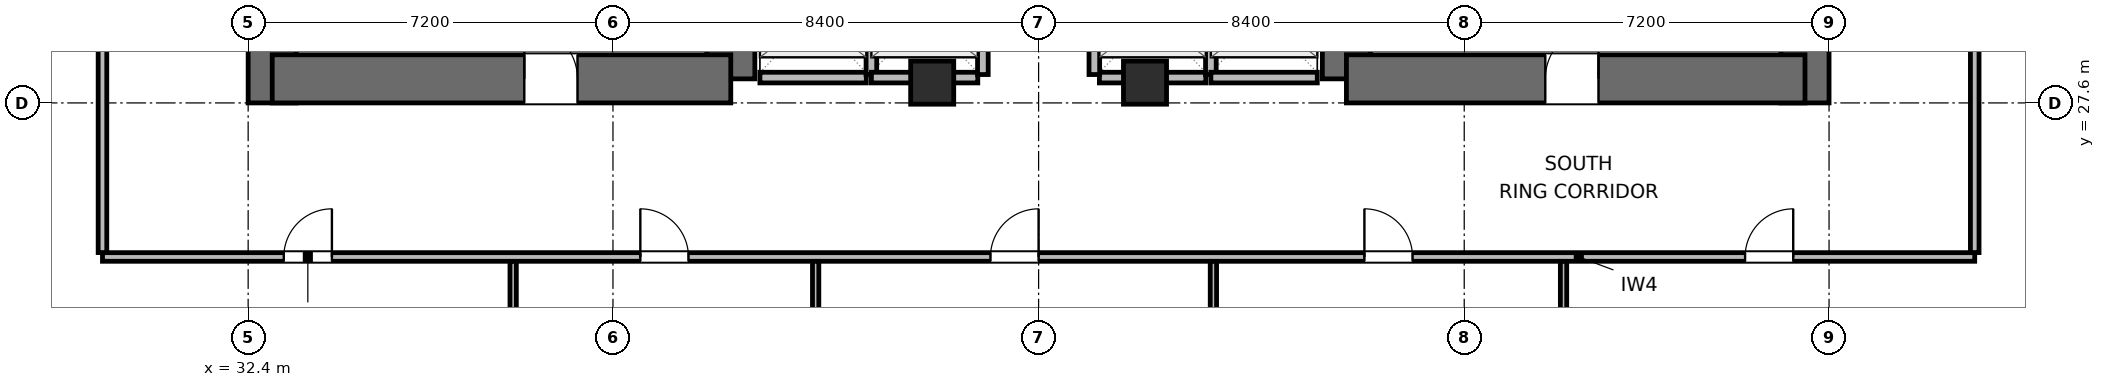
"""IFC4 building model, lengths in metres.
Left out: names, types, materials, properties, quantities, classifications, styles, units other than length and angle.
Written with IfcOpenShell. Run it as: python <this file> out.ifc"""

import sys

from ifc_helpers import new_model, si_unit, direction, frame, frame_2d, origin, origin_2d, place, context, subcontext, project, spatial, rectangle, extrude, element, fill, save


model = new_model("IFC4")
c1 = context("Model", 3, precision=1e-05, world=origin(), true_north=direction((0.0, 1.0)))
c2 = subcontext(c1, "Body", "Model", "MODEL_VIEW")
j1 = project(units=[si_unit("LENGTHUNIT", "METRE"), si_unit("PLANEANGLEUNIT", "RADIAN")], contexts=[c1])
p1 = place(None, origin())
s1 = spatial("IfcSite", under=j1, at=p1, CompositionType="ELEMENT")
p2 = place(p1, origin())
s2 = spatial("IfcBuilding", under=s1, at=p2, CompositionType="ELEMENT")
p3 = place(p2, frame((0.0, 0.0, 76.8)))
s3 = spatial("IfcBuildingStorey", under=s2, at=p3, CompositionType="ELEMENT", Elevation=76.8)
p4 = place(p3, frame((32.875, 27.6, 0.0), z_axis=(0.0, 0.0, 1.0), x_axis=(0.0, 1.0, 0.0)))
e1 = element("IfcWall", 1, at=p4, inside=s3, PredefinedType="SHEAR", context=c2, shape_type="SweptSolid", body=[
    extrude(rectangle(XDim=16.8, YDim=0.95, at=frame_2d((8.4, 0.0))), origin(), (0.0, 0.0, 1.0), 3.9),
])
p5 = place(p3, frame((41.925, 28.075, 0.0), z_axis=(0.0, 0.0, 1.0), x_axis=(0.0, 1.0, 0.0)))
e2 = element("IfcWall", 2, at=p5, inside=s3, PredefinedType="SHEAR", context=c2, shape_type="SweptSolid", body=[
    extrude(rectangle(XDim=6.325, YDim=0.95, at=frame_2d((3.163, 0.0))), origin(), (0.0, 0.0, 1.0), 3.9),
])
p6 = place(p3, frame((32.875, 28.075, 0.0), z_axis=(0.0, 0.0, 1.0), x_axis=(1.0, 0.0, 0.0)))
e3 = element("IfcWall", 3, at=p6, inside=s3, PredefinedType="SHEAR", context=c2, shape_type="SweptSolid", body=[
    extrude(rectangle(XDim=9.05, YDim=0.95, at=frame_2d((4.525, 0.0))), origin(), (0.0, 0.0, 1.0), 3.9),
])
p7 = place(p6, frame((4.975, 0.0, 0.0)))
e4 = element("IfcOpeningElement", 4, at=p7, cuts=e3, PredefinedType="OPENING", context=c2, shape_type="SweptSolid", body=[
    extrude(rectangle(XDim=1.05, YDim=2.04, at=frame_2d((0.525, 1.02))), frame((0.0, 0.485, 0.0), z_axis=(0.0, -1.0, 0.0), x_axis=(1.0, 0.0, 0.0)), (0.0, 0.0, 1.0), 0.97),
])
p8 = place(p3, frame((54.075, 28.075, 0.0), z_axis=(0.0, 0.0, 1.0), x_axis=(0.0, 1.0, 0.0)))
e5 = element("IfcWall", 5, at=p8, inside=s3, PredefinedType="SHEAR", context=c2, shape_type="SweptSolid", body=[
    extrude(rectangle(XDim=7.725, YDim=0.95, at=frame_2d((3.863, 0.0))), origin(), (0.0, 0.0, 1.0), 3.9),
])
p9 = place(p3, frame((63.125, 27.6, 0.0), z_axis=(0.0, 0.0, 1.0), x_axis=(0.0, 1.0, 0.0)))
e6 = element("IfcWall", 6, at=p9, inside=s3, PredefinedType="SHEAR", context=c2, shape_type="SweptSolid", body=[
    extrude(rectangle(XDim=16.8, YDim=0.95, at=frame_2d((8.4, 0.0))), origin(), (0.0, 0.0, 1.0), 3.9),
])
p10 = place(p3, frame((54.075, 28.075, 0.0), z_axis=(0.0, 0.0, 1.0), x_axis=(1.0, 0.0, 0.0)))
e7 = element("IfcWall", 7, at=p10, inside=s3, PredefinedType="SHEAR", context=c2, shape_type="SweptSolid", body=[
    extrude(rectangle(XDim=9.05, YDim=0.95, at=frame_2d((4.525, 0.0))), origin(), (0.0, 0.0, 1.0), 3.9),
])
p11 = place(p10, frame((3.925, 0.0, 0.0)))
e8 = element("IfcOpeningElement", 8, at=p11, cuts=e7, PredefinedType="OPENING", context=c2, shape_type="SweptSolid", body=[
    extrude(rectangle(XDim=1.05, YDim=2.04, at=frame_2d((0.525, 1.02))), frame((0.0, 0.485, 0.0), z_axis=(0.0, -1.0, 0.0), x_axis=(1.0, 0.0, 0.0)), (0.0, 0.0, 1.0), 0.97),
])
for number, where, z_axis, x_axis in (
    (9, (45.9, 28.0, 0.0), (0.0, 0.0, 1.0), (1.0, 0.0, 0.0)),
    (10, (50.1, 28.0, 0.0), (0.0, 0.0, 1.0), (1.0, 0.0, 0.0)),
):
    element("IfcColumn", number, at=place(p3, frame(where, z_axis=z_axis, x_axis=x_axis)), inside=s3, PredefinedType="COLUMN", context=c2, shape_type="SweptSolid", body=[
        extrude(rectangle(XDim=0.85, YDim=0.85, at=origin_2d()), origin(), (0.0, 0.0, 1.0), 3.9),
    ])
p12 = place(p3, frame((42.5, 28.1, 0.0), z_axis=(0.0, 0.0, 1.0), x_axis=(1.0, 0.0, 0.0)))
e11 = element("IfcWall", 11, at=p12, inside=s3, PredefinedType="PARTITIONING", context=c2, shape_type="SweptSolid", body=[
    extrude(rectangle(XDim=2.1, YDim=0.21, at=frame_2d((1.05, 0.0))), origin(), (0.0, 0.0, 1.0), 2.485),
])
p13 = place(p3, frame((44.7, 28.16, 0.0), z_axis=(0.0, 0.0, 1.0), x_axis=(0.0, 1.0, 0.0)))
e12 = element("IfcWall", 12, at=p13, inside=s3, PredefinedType="PARTITIONING", context=c2, shape_type="SweptSolid", body=[
    extrude(rectangle(XDim=2.28, YDim=0.21, at=frame_2d((1.14, 0.0))), origin(), (0.0, 0.0, 1.0), 3.6),
])
p14 = place(p3, frame((44.7, 28.1, 0.0), z_axis=(0.0, 0.0, 1.0), x_axis=(1.0, 0.0, 0.0)))
e13 = element("IfcWall", 13, at=p14, inside=s3, PredefinedType="PARTITIONING", context=c2, shape_type="SweptSolid", body=[
    extrude(rectangle(XDim=2.1, YDim=0.21, at=frame_2d((1.05, 0.0))), origin(), (0.0, 0.0, 1.0), 2.485),
])
p15 = place(p3, frame((46.9, 28.16, 0.0), z_axis=(0.0, 0.0, 1.0), x_axis=(0.0, 1.0, 0.0)))
e14 = element("IfcWall", 14, at=p15, inside=s3, PredefinedType="PARTITIONING", context=c2, shape_type="SweptSolid", body=[
    extrude(rectangle(XDim=2.28, YDim=0.21, at=frame_2d((1.14, 0.0))), origin(), (0.0, 0.0, 1.0), 3.6),
])
p16 = place(p3, frame((49.2, 28.1, 0.0), z_axis=(0.0, 0.0, 1.0), x_axis=(1.0, 0.0, 0.0)))
e15 = element("IfcWall", 15, at=p16, inside=s3, PredefinedType="PARTITIONING", context=c2, shape_type="SweptSolid", body=[
    extrude(rectangle(XDim=2.1, YDim=0.21, at=frame_2d((1.05, 0.0))), origin(), (0.0, 0.0, 1.0), 2.485),
])
for number, where, z_axis, x_axis in (
    (16, (49.1, 28.16, 0.0), (0.0, 0.0, 1.0), (0.0, 1.0, 0.0)),
    (17, (51.4, 28.16, 0.0), (0.0, 0.0, 1.0), (0.0, 1.0, 0.0)),
):
    element("IfcWall", number, at=place(p3, frame(where, z_axis=z_axis, x_axis=x_axis)), inside=s3, PredefinedType="PARTITIONING", context=c2, shape_type="SweptSolid", body=[
        extrude(rectangle(XDim=2.28, YDim=0.21, at=frame_2d((1.14, 0.0))), origin(), (0.0, 0.0, 1.0), 3.6),
    ])
p17 = place(p3, frame((51.4, 28.1, 0.0), z_axis=(0.0, 0.0, 1.0), x_axis=(1.0, 0.0, 0.0)))
e18 = element("IfcWall", 18, at=p17, inside=s3, PredefinedType="PARTITIONING", context=c2, shape_type="SweptSolid", body=[
    extrude(rectangle(XDim=2.1, YDim=0.21, at=frame_2d((1.05, 0.0))), origin(), (0.0, 0.0, 1.0), 2.485),
])
p18 = place(p3, frame((29.525, 24.56, 0.0), z_axis=(0.0, 0.0, 1.0), x_axis=(1.0, 0.0, 0.0)))
e19 = element("IfcWall", 19, at=p18, inside=s3, PredefinedType="PARTITIONING", context=c2, shape_type="SweptSolid", body=[
    extrude(rectangle(XDim=36.95, YDim=0.17, at=frame_2d((18.475, 0.0))), origin(), (0.0, 0.0, 1.0), 3.6),
])
p19 = place(p18, frame((3.578, 0.0, 0.0)))
e20 = element("IfcOpeningElement", 20, at=p19, cuts=e19, PredefinedType="OPENING", context=c2, shape_type="SweptSolid", body=[
    extrude(rectangle(XDim=0.95, YDim=2.04, at=frame_2d((0.475, 1.02))), frame((0.0, 0.095, 0.0), z_axis=(0.0, -1.0, 0.0), x_axis=(1.0, 0.0, 0.0)), (0.0, 0.0, 1.0), 0.19),
])
p20 = place(p18, frame((10.615, 0.0, 0.0)))
e21 = element("IfcOpeningElement", 21, at=p20, cuts=e19, PredefinedType="OPENING", context=c2, shape_type="SweptSolid", body=[
    extrude(rectangle(XDim=0.95, YDim=2.04, at=frame_2d((0.475, 1.02))), frame((0.0, 0.095, 0.0), z_axis=(0.0, -1.0, 0.0), x_axis=(1.0, 0.0, 0.0)), (0.0, 0.0, 1.0), 0.19),
])
p21 = place(p18, frame((17.525, 0.0, 0.0)))
e22 = element("IfcOpeningElement", 22, at=p21, cuts=e19, PredefinedType="OPENING", context=c2, shape_type="SweptSolid", body=[
    extrude(rectangle(XDim=0.95, YDim=2.04, at=frame_2d((0.475, 1.02))), frame((0.0, 0.095, 0.0), z_axis=(0.0, -1.0, 0.0), x_axis=(1.0, 0.0, 0.0)), (0.0, 0.0, 1.0), 0.19),
])
p22 = place(p18, frame((24.905, 0.0, 0.0)))
e23 = element("IfcOpeningElement", 23, at=p22, cuts=e19, PredefinedType="OPENING", context=c2, shape_type="SweptSolid", body=[
    extrude(rectangle(XDim=0.95, YDim=2.04, at=frame_2d((0.475, 1.02))), frame((0.0, 0.095, 0.0), z_axis=(0.0, -1.0, 0.0), x_axis=(1.0, 0.0, 0.0)), (0.0, 0.0, 1.0), 0.19),
])
p23 = place(p18, frame((32.418, 0.0, 0.0)))
e24 = element("IfcOpeningElement", 24, at=p23, cuts=e19, PredefinedType="OPENING", context=c2, shape_type="SweptSolid", body=[
    extrude(rectangle(XDim=0.95, YDim=2.04, at=frame_2d((0.475, 1.02))), frame((0.0, 0.095, 0.0), z_axis=(0.0, -1.0, 0.0), x_axis=(1.0, 0.0, 0.0)), (0.0, 0.0, 1.0), 0.19),
])
p24 = place(p3, frame((29.525, 24.647, 0.0), z_axis=(0.0, 0.0, 1.0), x_axis=(0.0, 1.0, 0.0)))
e25 = element("IfcWall", 25, at=p24, inside=s3, PredefinedType="PARTITIONING", context=c2, shape_type="SweptSolid", body=[
    extrude(rectangle(XDim=22.706, YDim=0.17, at=frame_2d((11.353, 0.0))), origin(), (0.0, 0.0, 1.0), 3.6),
])
p25 = place(p24, frame((4.758, 0.0, 0.0)))
e26 = element("IfcOpeningElement", 26, at=p25, cuts=e25, PredefinedType="OPENING", context=c2, shape_type="SweptSolid", body=[
    extrude(rectangle(XDim=0.95, YDim=2.04, at=frame_2d((0.475, 1.02))), frame((0.0, 0.095, 0.0), z_axis=(0.0, -1.0, 0.0), x_axis=(1.0, 0.0, 0.0)), (0.0, 0.0, 1.0), 0.19),
])
p26 = place(p24, frame((16.198, 0.0, 0.0)))
e27 = element("IfcOpeningElement", 27, at=p26, cuts=e25, PredefinedType="OPENING", context=c2, shape_type="SweptSolid", body=[
    extrude(rectangle(XDim=0.95, YDim=2.04, at=frame_2d((0.475, 1.02))), frame((0.0, 0.095, 0.0), z_axis=(0.0, -1.0, 0.0), x_axis=(1.0, 0.0, 0.0)), (0.0, 0.0, 1.0), 0.19),
])
p27 = place(p3, frame((66.475, 24.647, 0.0), z_axis=(0.0, 0.0, 1.0), x_axis=(0.0, 1.0, 0.0)))
e28 = element("IfcWall", 28, at=p27, inside=s3, PredefinedType="PARTITIONING", context=c2, shape_type="SweptSolid", body=[
    extrude(rectangle(XDim=22.706, YDim=0.17, at=frame_2d((11.353, 0.0))), origin(), (0.0, 0.0, 1.0), 3.6),
])
p28 = place(p27, frame((4.658, 0.0, 0.0)))
e29 = element("IfcOpeningElement", 29, at=p28, cuts=e28, PredefinedType="OPENING", context=c2, shape_type="SweptSolid", body=[
    extrude(rectangle(XDim=0.95, YDim=2.04, at=frame_2d((0.475, 1.02))), frame((0.0, 0.095, 0.0), z_axis=(0.0, -1.0, 0.0), x_axis=(1.0, 0.0, 0.0)), (0.0, 0.0, 1.0), 0.19),
])
p29 = place(p27, frame((16.098, 0.0, 0.0)))
e30 = element("IfcOpeningElement", 30, at=p29, cuts=e28, PredefinedType="OPENING", context=c2, shape_type="SweptSolid", body=[
    extrude(rectangle(XDim=0.95, YDim=2.04, at=frame_2d((0.475, 1.02))), frame((0.0, 0.095, 0.0), z_axis=(0.0, -1.0, 0.0), x_axis=(1.0, 0.0, 0.0)), (0.0, 0.0, 1.0), 0.19),
])
p30 = place(p3, frame((37.63, 9.915, 0.0), z_axis=(0.0, 0.0, 1.0), x_axis=(0.0, 1.0, 0.0)))
e31 = element("IfcWall", 31, at=p30, inside=s3, PredefinedType="PARTITIONING", context=c2, shape_type="SweptSolid", body=[
    extrude(rectangle(XDim=14.558, YDim=0.125, at=frame_2d((7.279, 0.0))), origin(), (0.0, 0.0, 1.0), 3.6),
])
p31 = place(p3, frame((43.6, 13.575, 0.0), z_axis=(0.0, 0.0, 1.0), x_axis=(0.0, 1.0, 0.0)))
e32 = element("IfcWall", 32, at=p31, inside=s3, PredefinedType="PARTITIONING", context=c2, shape_type="SweptSolid", body=[
    extrude(rectangle(XDim=10.898, YDim=0.125, at=frame_2d((5.449, 0.0))), origin(), (0.0, 0.0, 1.0), 2.963),
])
p32 = place(p3, frame((51.45, 11.515, 0.0), z_axis=(0.0, 0.0, 1.0), x_axis=(0.0, 1.0, 0.0)))
e33 = element("IfcWall", 33, at=p32, inside=s3, PredefinedType="PARTITIONING", context=c2, shape_type="SweptSolid", body=[
    extrude(rectangle(XDim=12.958, YDim=0.125, at=frame_2d((6.479, 0.0))), origin(), (0.0, 0.0, 1.0), 2.963),
])
p33 = place(p3, frame((58.36, 9.915, 0.0), z_axis=(0.0, 0.0, 1.0), x_axis=(0.0, 1.0, 0.0)))
e34 = element("IfcWall", 34, at=p33, inside=s3, PredefinedType="PARTITIONING", context=c2, shape_type="SweptSolid", body=[
    extrude(rectangle(XDim=14.558, YDim=0.125, at=frame_2d((7.279, 0.0))), origin(), (0.0, 0.0, 1.0), 3.6),
])
p34 = place(p7, origin())
e35 = element("IfcDoor", 35, at=p34, inside=s3, OperationType="SINGLE_SWING_LEFT", PredefinedType="DOOR", context=c2, shape_type="SweptSolid", body=[
    extrude(rectangle(XDim=1.05, YDim=2.04, at=frame_2d((0.525, 1.02))), frame((0.0, 0.025, 0.0), z_axis=(0.0, -1.0, 0.0), x_axis=(1.0, 0.0, 0.0)), (0.0, 0.0, 1.0), 0.05),
])
fill(e4, e35)
p35 = place(p11, origin())
e36 = element("IfcDoor", 36, at=p35, inside=s3, OperationType="SINGLE_SWING_RIGHT", PredefinedType="DOOR", context=c2, shape_type="SweptSolid", body=[
    extrude(rectangle(XDim=1.05, YDim=2.04, at=frame_2d((0.525, 1.02))), frame((0.0, 0.025, 0.0), z_axis=(0.0, -1.0, 0.0), x_axis=(1.0, 0.0, 0.0)), (0.0, 0.0, 1.0), 0.05),
])
fill(e8, e36)
p36 = place(p19, origin())
e37 = element("IfcDoor", 37, at=p36, inside=s3, OperationType="SINGLE_SWING_RIGHT", PredefinedType="DOOR", context=c2, shape_type="SweptSolid", body=[
    extrude(rectangle(XDim=0.95, YDim=2.04, at=frame_2d((0.475, 1.02))), frame((0.0, 0.025, 0.0), z_axis=(0.0, -1.0, 0.0), x_axis=(1.0, 0.0, 0.0)), (0.0, 0.0, 1.0), 0.05),
])
fill(e20, e37)
p37 = place(p20, origin())
e38 = element("IfcDoor", 38, at=p37, inside=s3, OperationType="SINGLE_SWING_LEFT", PredefinedType="DOOR", context=c2, shape_type="SweptSolid", body=[
    extrude(rectangle(XDim=0.95, YDim=2.04, at=frame_2d((0.475, 1.02))), frame((0.0, 0.025, 0.0), z_axis=(0.0, -1.0, 0.0), x_axis=(1.0, 0.0, 0.0)), (0.0, 0.0, 1.0), 0.05),
])
fill(e21, e38)
p38 = place(p21, origin())
e39 = element("IfcDoor", 39, at=p38, inside=s3, OperationType="SINGLE_SWING_RIGHT", PredefinedType="DOOR", context=c2, shape_type="SweptSolid", body=[
    extrude(rectangle(XDim=0.95, YDim=2.04, at=frame_2d((0.475, 1.02))), frame((0.0, 0.025, 0.0), z_axis=(0.0, -1.0, 0.0), x_axis=(1.0, 0.0, 0.0)), (0.0, 0.0, 1.0), 0.05),
])
fill(e22, e39)
p39 = place(p22, origin())
e40 = element("IfcDoor", 40, at=p39, inside=s3, OperationType="SINGLE_SWING_LEFT", PredefinedType="DOOR", context=c2, shape_type="SweptSolid", body=[
    extrude(rectangle(XDim=0.95, YDim=2.04, at=frame_2d((0.475, 1.02))), frame((0.0, 0.025, 0.0), z_axis=(0.0, -1.0, 0.0), x_axis=(1.0, 0.0, 0.0)), (0.0, 0.0, 1.0), 0.05),
])
fill(e23, e40)
p40 = place(p23, origin())
e41 = element("IfcDoor", 41, at=p40, inside=s3, OperationType="SINGLE_SWING_RIGHT", PredefinedType="DOOR", context=c2, shape_type="SweptSolid", body=[
    extrude(rectangle(XDim=0.95, YDim=2.04, at=frame_2d((0.475, 1.02))), frame((0.0, 0.025, 0.0), z_axis=(0.0, -1.0, 0.0), x_axis=(1.0, 0.0, 0.0)), (0.0, 0.0, 1.0), 0.05),
])
fill(e24, e41)
save(model, sys.argv[1])
